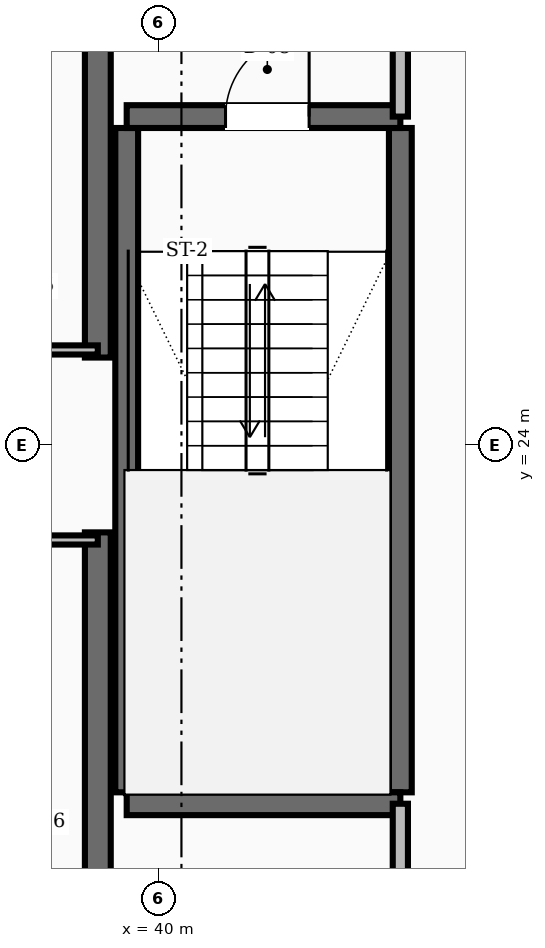
"""IFC4 building model, lengths in metres.
Left out: names, types, materials, properties, quantities, classifications, styles, units other than length and angle.
Written with IfcOpenShell. Run it as: python <this file> out.ifc"""

import sys

from ifc_helpers import new_model, si_unit, direction, frame, frame_2d, origin, place, context, subcontext, project, spatial, rectangle, extrude, element, fill, save


model = new_model("IFC4")
c1 = context("Model", 3, precision=1e-05, world=origin(), true_north=direction((0.0, 1.0)))
c2 = subcontext(c1, "Body", "Model", "MODEL_VIEW")
j1 = project(units=[si_unit("LENGTHUNIT", "METRE"), si_unit("PLANEANGLEUNIT", "RADIAN")], contexts=[c1])
p1 = place(None, origin())
s1 = spatial("IfcSite", under=j1, at=p1, CompositionType="ELEMENT")
p2 = place(p1, origin())
s2 = spatial("IfcBuilding", under=s1, at=p2, CompositionType="ELEMENT")
p3 = place(p2, frame((0.0, 0.0, 185.6)))
s3 = spatial("IfcBuildingStorey", under=s2, at=p3, CompositionType="ELEMENT", Elevation=185.6)
for number, where, z_axis, x_axis in (
    (1, (39.2, 16.55, 0.0), (0.0, 0.0, 1.0), (0.0, 1.0, 0.0)),
    (2, (39.2, 25.15, 0.0), (0.0, 0.0, 1.0), (0.0, 1.0, 0.0)),
):
    element("IfcWall", number, at=place(p3, frame(where, z_axis=z_axis, x_axis=x_axis)), inside=s3, PredefinedType="SHEAR", context=c2, shape_type="SweptSolid", body=[
        extrude(rectangle(XDim=6.3, YDim=0.34, at=frame_2d((3.15, 0.0))), origin(), (0.0, 0.0, 1.0), 3.6),
    ])
for number, where, z_axis, x_axis in (
    (3, (43.18, 19.43, 0.0), (0.0, 0.0, 1.0), (0.0, 1.0, 0.0)),
    (4, (39.58, 19.43, 0.0), (0.0, 0.0, 1.0), (0.0, 1.0, 0.0)),
):
    element("IfcWall", number, at=place(p3, frame(where, z_axis=z_axis, x_axis=x_axis)), inside=s3, PredefinedType="SHEAR", context=c2, shape_type="SweptSolid", body=[
        extrude(rectangle(XDim=8.74, YDim=0.3, at=frame_2d((4.37, 0.0))), origin(), (0.0, 0.0, 1.0), 3.6),
    ])
p4 = place(p3, frame((39.58, 19.28, 0.0), z_axis=(0.0, 0.0, 1.0), x_axis=(1.0, 0.0, 0.0)))
e5 = element("IfcWall", 5, at=p4, inside=s3, PredefinedType="SHEAR", context=c2, shape_type="SweptSolid", body=[
    extrude(rectangle(XDim=3.6, YDim=0.3, at=frame_2d((1.8, 0.0))), origin(), (0.0, 0.0, 1.0), 3.6),
])
p5 = place(p3, frame((39.58, 28.32, 0.0), z_axis=(0.0, 0.0, 1.0), x_axis=(1.0, 0.0, 0.0)))
e6 = element("IfcWall", 6, at=p5, inside=s3, PredefinedType="SHEAR", context=c2, shape_type="SweptSolid", body=[
    extrude(rectangle(XDim=3.6, YDim=0.3, at=frame_2d((1.8, 0.0))), origin(), (0.0, 0.0, 1.0), 3.6),
])
p6 = place(p5, frame((1.3, 0.0, 0.0)))
e7 = element("IfcOpeningElement", 7, at=p6, cuts=e6, PredefinedType="OPENING", context=c2, shape_type="SweptSolid", body=[
    extrude(rectangle(XDim=1.1, YDim=2.1, at=frame_2d((0.55, 1.05))), frame((0.0, 0.16, 0.0), z_axis=(0.0, -1.0, 0.0), x_axis=(1.0, 0.0, 0.0)), (0.0, 0.0, 1.0), 0.32),
])
p7 = place(p3, frame((43.18, 28.32, 0.0), z_axis=(0.0, 0.0, 1.0), x_axis=(0.0, 1.0, 0.0)))
e8 = element("IfcWall", 8, at=p7, inside=s3, PredefinedType="SOLIDWALL", context=c2, shape_type="SweptSolid", body=[
    extrude(rectangle(XDim=3.13, YDim=0.2, at=frame_2d((1.565, 0.0))), origin(), (0.0, 0.0, 1.0), 2.8),
])
p8 = place(p7, frame((1.015, 0.0, 0.0)))
e9 = element("IfcOpeningElement", 9, at=p8, cuts=e8, PredefinedType="OPENING", context=c2, shape_type="SweptSolid", body=[
    extrude(rectangle(XDim=1.1, YDim=2.1, at=frame_2d((0.55, 1.05))), frame((0.0, 0.11, 0.0), z_axis=(0.0, -1.0, 0.0), x_axis=(1.0, 0.0, 0.0)), (0.0, 0.0, 1.0), 0.22),
])
p9 = place(p3, frame((43.18, 16.55, 0.0), z_axis=(0.0, 0.0, 1.0), x_axis=(0.0, 1.0, 0.0)))
e10 = element("IfcWall", 10, at=p9, inside=s3, PredefinedType="SOLIDWALL", context=c2, shape_type="SweptSolid", body=[
    extrude(rectangle(XDim=2.73, YDim=0.2, at=frame_2d((1.365, 0.0))), origin(), (0.0, 0.0, 1.0), 2.8),
])
p10 = place(p9, frame((0.89, 0.0, 0.0)))
e11 = element("IfcOpeningElement", 11, at=p10, cuts=e10, PredefinedType="OPENING", context=c2, shape_type="SweptSolid", body=[
    extrude(rectangle(XDim=0.95, YDim=2.1, at=frame_2d((0.475, 1.05))), frame((0.0, 0.11, 0.0), z_axis=(0.0, -1.0, 0.0), x_axis=(1.0, 0.0, 0.0)), (0.0, 0.0, 1.0), 0.22),
])
for number, where, z_axis, x_axis in (
    (12, (37.4, 25.25, 0.0), (0.0, 0.0, 1.0), (1.0, 0.0, 0.0)),
    (13, (37.4, 22.75, 0.0), (0.0, 0.0, 1.0), (1.0, 0.0, 0.0)),
):
    element("IfcWall", number, at=place(p3, frame(where, z_axis=z_axis, x_axis=x_axis)), inside=s3, PredefinedType="PARTITIONING", context=c2, shape_type="SweptSolid", body=[
        extrude(rectangle(XDim=1.8, YDim=0.12, at=frame_2d((0.9, 0.0))), origin(), (0.0, 0.0, 1.0), 2.8),
    ])
p11 = place(p6, origin())
e14 = element("IfcDoor", 14, at=p11, inside=s3, OperationType="SINGLE_SWING_RIGHT", PredefinedType="DOOR", context=c2, shape_type="SweptSolid", body=[
    extrude(rectangle(XDim=1.1, YDim=2.1, at=frame_2d((0.55, 1.05))), frame((0.0, 0.025, 0.0), z_axis=(0.0, -1.0, 0.0), x_axis=(1.0, 0.0, 0.0)), (0.0, 0.0, 1.0), 0.05),
])
fill(e7, e14)
save(model, sys.argv[1])
